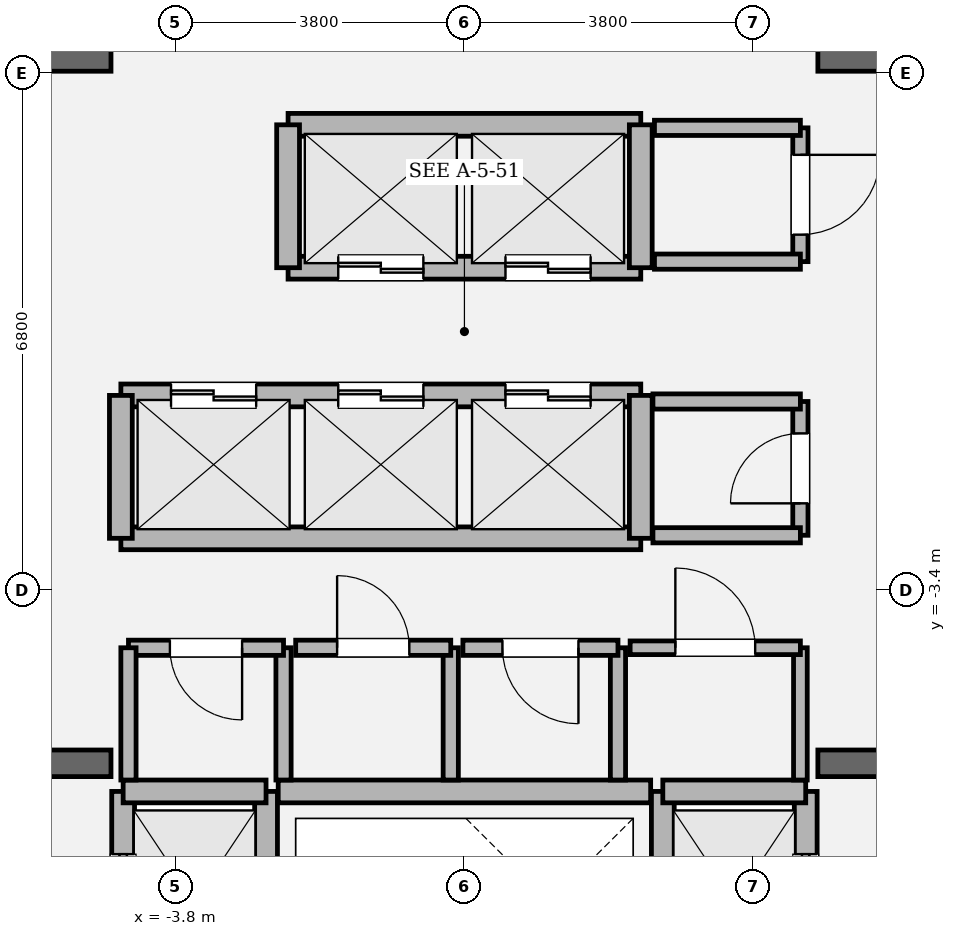
"""IFC4 building model, lengths in metres.
Left out: names, types, materials, properties, quantities, classifications, styles, units other than length and angle.
Written with IfcOpenShell. Run it as: python <this file> out.ifc"""

import sys

from ifc_helpers import new_model, si_unit, direction, frame, frame_2d, origin, place, context, subcontext, project, spatial, rectangle, extrude, element, fill, save


model = new_model("IFC4")
c1 = context("Model", 3, precision=1e-05, world=origin(), true_north=direction((0.0, 1.0)))
c2 = subcontext(c1, "Body", "Model", "MODEL_VIEW")
j1 = project(units=[si_unit("LENGTHUNIT", "METRE"), si_unit("PLANEANGLEUNIT", "RADIAN")], contexts=[c1])
p1 = place(None, origin())
s1 = spatial("IfcSite", under=j1, at=p1, CompositionType="ELEMENT")
p2 = place(p1, origin())
s2 = spatial("IfcBuilding", under=s1, at=p2, CompositionType="ELEMENT")
p3 = place(p2, frame((0.0, 0.0, 246.6)))
s3 = spatial("IfcBuildingStorey", under=s2, at=p3, CompositionType="ELEMENT", Elevation=246.6)
p4 = place(p3, frame((-9.925, -5.68, 0.0), z_axis=(0.0, 0.0, 1.0), x_axis=(1.0, 0.0, 0.0)))
e1 = element("IfcWall", 1, at=p4, inside=s3, PredefinedType="SOLIDWALL", context=c2, shape_type="SweptSolid", body=[
    extrude(rectangle(XDim=5.275, YDim=0.35, at=frame_2d((2.638, 0.0))), origin(), (0.0, 0.0, 1.0), 4.8),
])
p5 = place(p4, frame((1.385, 0.0, 0.0)))
e2 = element("IfcOpeningElement", 2, at=p5, cuts=e1, PredefinedType="OPENING", context=c2, shape_type="SweptSolid", body=[
    extrude(rectangle(XDim=1.18, YDim=2.2, at=frame_2d((0.59, 1.1))), frame((0.0, 0.185, 0.0), z_axis=(0.0, -1.0, 0.0), x_axis=(1.0, 0.0, 0.0)), (0.0, 0.0, 1.0), 0.37),
])
p6 = place(p3, frame((4.65, -5.68, 0.0), z_axis=(0.0, 0.0, 1.0), x_axis=(1.0, 0.0, 0.0)))
e3 = element("IfcWall", 3, at=p6, inside=s3, PredefinedType="SOLIDWALL", context=c2, shape_type="SweptSolid", body=[
    extrude(rectangle(XDim=5.275, YDim=0.35, at=frame_2d((2.638, 0.0))), origin(), (0.0, 0.0, 1.0), 4.8),
])
p7 = place(p6, frame((2.71, 0.0, 0.0)))
e4 = element("IfcOpeningElement", 4, at=p7, cuts=e3, PredefinedType="OPENING", context=c2, shape_type="SweptSolid", body=[
    extrude(rectangle(XDim=1.18, YDim=2.2, at=frame_2d((0.59, 1.1))), frame((0.0, 0.185, 0.0), z_axis=(0.0, -1.0, 0.0), x_axis=(1.0, 0.0, 0.0)), (0.0, 0.0, 1.0), 0.37),
])
for number, where, z_axis, x_axis in (
    (5, (-9.925, 3.6, 0.0), (0.0, 0.0, 1.0), (1.0, 0.0, 0.0)),
    (6, (4.65, 3.6, 0.0), (0.0, 0.0, 1.0), (1.0, 0.0, 0.0)),
):
    element("IfcWall", number, at=place(p3, frame(where, z_axis=z_axis, x_axis=x_axis)), inside=s3, PredefinedType="SOLIDWALL", context=c2, shape_type="SweptSolid", body=[
        extrude(rectangle(XDim=5.275, YDim=0.35, at=frame_2d((2.638, 0.0))), origin(), (0.0, 0.0, 1.0), 4.8),
    ])
p8 = place(p3, frame((-4.49, -8.82, 0.0), z_axis=(0.0, 0.0, 1.0), x_axis=(0.0, 1.0, 0.0)))
e7 = element("IfcWall", 7, at=p8, inside=s3, PredefinedType="SOLIDWALL", context=c2, shape_type="SweptSolid", body=[
    extrude(rectangle(XDim=2.77, YDim=0.3, at=frame_2d((1.385, 0.0))), origin(), (0.0, 0.0, 1.0), 4.52),
])
p9 = place(p8, frame((0.825, 0.0, 0.0)))
e8 = element("IfcOpeningElement", 8, at=p9, cuts=e7, PredefinedType="OPENING", context=c2, shape_type="SweptSolid", body=[
    extrude(rectangle(XDim=1.12, YDim=2.25, at=frame_2d((0.56, 1.125))), frame((0.0, 0.16, 0.0), z_axis=(0.0, -1.0, 0.0), x_axis=(1.0, 0.0, 0.0)), (0.0, 0.0, 1.0), 0.32),
])
p10 = place(p3, frame((-2.61, -8.82, 0.0), z_axis=(0.0, 0.0, 1.0), x_axis=(0.0, 1.0, 0.0)))
e9 = element("IfcWall", 9, at=p10, inside=s3, PredefinedType="SOLIDWALL", context=c2, shape_type="SweptSolid", body=[
    extrude(rectangle(XDim=2.77, YDim=0.3, at=frame_2d((1.385, 0.0))), origin(), (0.0, 0.0, 1.0), 4.52),
])
p11 = place(p3, frame((-4.49, -6.05, 0.0), z_axis=(0.0, 0.0, 1.0), x_axis=(1.0, 0.0, 0.0)))
e10 = element("IfcWall", 10, at=p11, inside=s3, PredefinedType="SOLIDWALL", context=c2, shape_type="SweptSolid", body=[
    extrude(rectangle(XDim=1.88, YDim=0.3, at=frame_2d((0.94, 0.0))), origin(), (0.0, 0.0, 1.0), 4.52),
])
p12 = place(p3, frame((4.49, -8.82, 0.0), z_axis=(0.0, 0.0, 1.0), x_axis=(0.0, 1.0, 0.0)))
e11 = element("IfcWall", 11, at=p12, inside=s3, PredefinedType="SOLIDWALL", context=c2, shape_type="SweptSolid", body=[
    extrude(rectangle(XDim=2.77, YDim=0.3, at=frame_2d((1.385, 0.0))), origin(), (0.0, 0.0, 1.0), 4.52),
])
p13 = place(p12, frame((0.825, 0.0, 0.0)))
e12 = element("IfcOpeningElement", 12, at=p13, cuts=e11, PredefinedType="OPENING", context=c2, shape_type="SweptSolid", body=[
    extrude(rectangle(XDim=1.12, YDim=2.25, at=frame_2d((0.56, 1.125))), frame((0.0, 0.16, 0.0), z_axis=(0.0, -1.0, 0.0), x_axis=(1.0, 0.0, 0.0)), (0.0, 0.0, 1.0), 0.32),
])
p14 = place(p3, frame((2.61, -8.82, 0.0), z_axis=(0.0, 0.0, 1.0), x_axis=(0.0, 1.0, 0.0)))
e13 = element("IfcWall", 13, at=p14, inside=s3, PredefinedType="SOLIDWALL", context=c2, shape_type="SweptSolid", body=[
    extrude(rectangle(XDim=2.77, YDim=0.3, at=frame_2d((1.385, 0.0))), origin(), (0.0, 0.0, 1.0), 4.52),
])
p15 = place(p3, frame((2.61, -6.05, 0.0), z_axis=(0.0, 0.0, 1.0), x_axis=(1.0, 0.0, 0.0)))
e14 = element("IfcWall", 14, at=p15, inside=s3, PredefinedType="SOLIDWALL", context=c2, shape_type="SweptSolid", body=[
    extrude(rectangle(XDim=1.88, YDim=0.3, at=frame_2d((0.94, 0.0))), origin(), (0.0, 0.0, 1.0), 4.52),
])
p16 = place(p3, frame((-4.52, -0.84, 0.0), z_axis=(0.0, 0.0, 1.0), x_axis=(1.0, 0.0, 0.0)))
e15 = element("IfcWall", 15, at=p16, inside=s3, PredefinedType="SOLIDWALL", context=c2, shape_type="SweptSolid", body=[
    extrude(rectangle(XDim=6.84, YDim=0.3, at=frame_2d((3.42, 0.0))), origin(), (0.0, 0.0, 1.0), 4.52),
])
p17 = place(p16, frame((0.66, 0.0, 0.0)))
e16 = element("IfcOpeningElement", 16, at=p17, cuts=e15, PredefinedType="OPENING", context=c2, shape_type="SweptSolid", body=[
    extrude(rectangle(XDim=1.12, YDim=2.25, at=frame_2d((0.56, 1.125))), frame((0.0, 0.16, 0.0), z_axis=(0.0, -1.0, 0.0), x_axis=(1.0, 0.0, 0.0)), (0.0, 0.0, 1.0), 0.32),
])
p18 = place(p16, frame((2.86, 0.0, 0.0)))
e17 = element("IfcOpeningElement", 17, at=p18, cuts=e15, PredefinedType="OPENING", context=c2, shape_type="SweptSolid", body=[
    extrude(rectangle(XDim=1.12, YDim=2.25, at=frame_2d((0.56, 1.125))), frame((0.0, 0.16, 0.0), z_axis=(0.0, -1.0, 0.0), x_axis=(1.0, 0.0, 0.0)), (0.0, 0.0, 1.0), 0.32),
])
p19 = place(p16, frame((5.06, 0.0, 0.0)))
e18 = element("IfcOpeningElement", 18, at=p19, cuts=e15, PredefinedType="OPENING", context=c2, shape_type="SweptSolid", body=[
    extrude(rectangle(XDim=1.12, YDim=2.25, at=frame_2d((0.56, 1.125))), frame((0.0, 0.16, 0.0), z_axis=(0.0, -1.0, 0.0), x_axis=(1.0, 0.0, 0.0)), (0.0, 0.0, 1.0), 0.32),
])
p20 = place(p3, frame((-4.52, -2.72, 0.0), z_axis=(0.0, 0.0, 1.0), x_axis=(1.0, 0.0, 0.0)))
e19 = element("IfcWall", 19, at=p20, inside=s3, PredefinedType="SOLIDWALL", context=c2, shape_type="SweptSolid", body=[
    extrude(rectangle(XDim=6.84, YDim=0.3, at=frame_2d((3.42, 0.0))), origin(), (0.0, 0.0, 1.0), 4.52),
])
for number, where, z_axis, x_axis in (
    (20, (-4.52, -2.72, 0.0), (0.0, 0.0, 1.0), (0.0, 1.0, 0.0)),
    (21, (2.32, -2.72, 0.0), (0.0, 0.0, 1.0), (0.0, 1.0, 0.0)),
):
    element("IfcWall", number, at=place(p3, frame(where, z_axis=z_axis, x_axis=x_axis)), inside=s3, PredefinedType="SOLIDWALL", context=c2, shape_type="SweptSolid", body=[
        extrude(rectangle(XDim=1.88, YDim=0.3, at=frame_2d((0.94, 0.0))), origin(), (0.0, 0.0, 1.0), 4.52),
    ])
p21 = place(p3, frame((-2.32, 0.84, 0.0), z_axis=(0.0, 0.0, 1.0), x_axis=(1.0, 0.0, 0.0)))
e22 = element("IfcWall", 22, at=p21, inside=s3, PredefinedType="SOLIDWALL", context=c2, shape_type="SweptSolid", body=[
    extrude(rectangle(XDim=4.64, YDim=0.3, at=frame_2d((2.32, 0.0))), origin(), (0.0, 0.0, 1.0), 4.52),
])
p22 = place(p21, frame((0.66, 0.0, 0.0)))
e23 = element("IfcOpeningElement", 23, at=p22, cuts=e22, PredefinedType="OPENING", context=c2, shape_type="SweptSolid", body=[
    extrude(rectangle(XDim=1.12, YDim=2.25, at=frame_2d((0.56, 1.125))), frame((0.0, 0.16, 0.0), z_axis=(0.0, -1.0, 0.0), x_axis=(1.0, 0.0, 0.0)), (0.0, 0.0, 1.0), 0.32),
])
p23 = place(p21, frame((2.86, 0.0, 0.0)))
e24 = element("IfcOpeningElement", 24, at=p23, cuts=e22, PredefinedType="OPENING", context=c2, shape_type="SweptSolid", body=[
    extrude(rectangle(XDim=1.12, YDim=2.25, at=frame_2d((0.56, 1.125))), frame((0.0, 0.16, 0.0), z_axis=(0.0, -1.0, 0.0), x_axis=(1.0, 0.0, 0.0)), (0.0, 0.0, 1.0), 0.32),
])
p24 = place(p3, frame((-2.32, 2.72, 0.0), z_axis=(0.0, 0.0, 1.0), x_axis=(1.0, 0.0, 0.0)))
e25 = element("IfcWall", 25, at=p24, inside=s3, PredefinedType="SOLIDWALL", context=c2, shape_type="SweptSolid", body=[
    extrude(rectangle(XDim=4.64, YDim=0.3, at=frame_2d((2.32, 0.0))), origin(), (0.0, 0.0, 1.0), 4.52),
])
for number, where, z_axis, x_axis in (
    (26, (-2.32, 0.84, 0.0), (0.0, 0.0, 1.0), (0.0, 1.0, 0.0)),
    (27, (2.32, 0.84, 0.0), (0.0, 0.0, 1.0), (0.0, 1.0, 0.0)),
):
    element("IfcWall", number, at=place(p3, frame(where, z_axis=z_axis, x_axis=x_axis)), inside=s3, PredefinedType="SOLIDWALL", context=c2, shape_type="SweptSolid", body=[
        extrude(rectangle(XDim=1.88, YDim=0.3, at=frame_2d((0.94, 0.0))), origin(), (0.0, 0.0, 1.0), 4.52),
    ])
p25 = place(p3, frame((-2.45, -6.05, 0.0), z_axis=(0.0, 0.0, 1.0), x_axis=(1.0, 0.0, 0.0)))
e28 = element("IfcWall", 28, at=p25, inside=s3, PredefinedType="SOLIDWALL", context=c2, shape_type="SweptSolid", body=[
    extrude(rectangle(XDim=4.9, YDim=0.3, at=frame_2d((2.45, 0.0))), origin(), (0.0, 0.0, 1.0), 4.52),
])
p26 = place(p3, frame((-2.38, -5.9, 0.0), z_axis=(0.0, 0.0, 1.0), x_axis=(0.0, 1.0, 0.0)))
e29 = element("IfcWall", 29, at=p26, inside=s3, PredefinedType="SOLIDWALL", context=c2, shape_type="SweptSolid", body=[
    extrude(rectangle(XDim=1.74, YDim=0.2, at=frame_2d((0.87, 0.0))), origin(), (0.0, 0.0, 1.0), 4.52),
])
p27 = place(p3, frame((-2.38, -4.16, 0.0), z_axis=(0.0, 0.0, 1.0), x_axis=(-1.0, 0.0, 0.0)))
e30 = element("IfcWall", 30, at=p27, inside=s3, PredefinedType="SOLIDWALL", context=c2, shape_type="SweptSolid", body=[
    extrude(rectangle(XDim=2.04, YDim=0.2, at=frame_2d((1.02, 0.0))), origin(), (0.0, 0.0, 1.0), 4.52),
])
p28 = place(p27, frame((0.545, 0.0, 0.0)))
e31 = element("IfcOpeningElement", 31, at=p28, cuts=e30, PredefinedType="OPENING", context=c2, shape_type="SweptSolid", body=[
    extrude(rectangle(XDim=0.95, YDim=2.15, at=frame_2d((0.475, 1.075))), frame((0.0, 0.11, 0.0), z_axis=(0.0, -1.0, 0.0), x_axis=(1.0, 0.0, 0.0)), (0.0, 0.0, 1.0), 0.22),
])
for number, where, z_axis, x_axis in (
    (32, (-4.42, -4.16, 0.0), (0.0, 0.0, 1.0), (0.0, -1.0, 0.0)),
    (33, (-0.18, -5.9, 0.0), (0.0, 0.0, 1.0), (0.0, 1.0, 0.0)),
):
    element("IfcWall", number, at=place(p3, frame(where, z_axis=z_axis, x_axis=x_axis)), inside=s3, PredefinedType="SOLIDWALL", context=c2, shape_type="SweptSolid", body=[
        extrude(rectangle(XDim=1.74, YDim=0.2, at=frame_2d((0.87, 0.0))), origin(), (0.0, 0.0, 1.0), 4.52),
    ])
p29 = place(p3, frame((-0.18, -4.16, 0.0), z_axis=(0.0, 0.0, 1.0), x_axis=(-1.0, 0.0, 0.0)))
e34 = element("IfcWall", 34, at=p29, inside=s3, PredefinedType="SOLIDWALL", context=c2, shape_type="SweptSolid", body=[
    extrude(rectangle(XDim=2.04, YDim=0.2, at=frame_2d((1.02, 0.0))), origin(), (0.0, 0.0, 1.0), 4.52),
])
p30 = place(p29, frame((0.545, 0.0, 0.0)))
e35 = element("IfcOpeningElement", 35, at=p30, cuts=e34, PredefinedType="OPENING", context=c2, shape_type="SweptSolid", body=[
    extrude(rectangle(XDim=0.95, YDim=2.15, at=frame_2d((0.475, 1.075))), frame((0.0, 0.11, 0.0), z_axis=(0.0, -1.0, 0.0), x_axis=(1.0, 0.0, 0.0)), (0.0, 0.0, 1.0), 0.22),
])
p31 = place(p3, frame((2.02, -5.9, 0.0), z_axis=(0.0, 0.0, 1.0), x_axis=(0.0, 1.0, 0.0)))
e36 = element("IfcWall", 36, at=p31, inside=s3, PredefinedType="SOLIDWALL", context=c2, shape_type="SweptSolid", body=[
    extrude(rectangle(XDim=1.74, YDim=0.2, at=frame_2d((0.87, 0.0))), origin(), (0.0, 0.0, 1.0), 4.52),
])
p32 = place(p3, frame((2.02, -4.16, 0.0), z_axis=(0.0, 0.0, 1.0), x_axis=(-1.0, 0.0, 0.0)))
e37 = element("IfcWall", 37, at=p32, inside=s3, PredefinedType="SOLIDWALL", context=c2, shape_type="SweptSolid", body=[
    extrude(rectangle(XDim=2.04, YDim=0.2, at=frame_2d((1.02, 0.0))), origin(), (0.0, 0.0, 1.0), 4.52),
])
p33 = place(p32, frame((0.52, 0.0, 0.0)))
e38 = element("IfcOpeningElement", 38, at=p33, cuts=e37, PredefinedType="OPENING", context=c2, shape_type="SweptSolid", body=[
    extrude(rectangle(XDim=1.0, YDim=2.15, at=frame_2d((0.5, 1.075))), frame((0.0, 0.11, 0.0), z_axis=(0.0, -1.0, 0.0), x_axis=(1.0, 0.0, 0.0)), (0.0, 0.0, 1.0), 0.22),
])
p34 = place(p3, frame((4.42, -5.9, 0.0), z_axis=(0.0, 0.0, 1.0), x_axis=(0.0, 1.0, 0.0)))
e39 = element("IfcWall", 39, at=p34, inside=s3, PredefinedType="PARTITIONING", context=c2, shape_type="SweptSolid", body=[
    extrude(rectangle(XDim=1.74, YDim=0.18, at=frame_2d((0.87, 0.0))), origin(), (0.0, 0.0, 1.0), 4.52),
])
p35 = place(p3, frame((4.42, -4.16, 0.0), z_axis=(0.0, 0.0, 1.0), x_axis=(-1.0, 0.0, 0.0)))
e40 = element("IfcWall", 40, at=p35, inside=s3, PredefinedType="PARTITIONING", context=c2, shape_type="SweptSolid", body=[
    extrude(rectangle(XDim=2.24, YDim=0.18, at=frame_2d((1.12, 0.0))), origin(), (0.0, 0.0, 1.0), 4.52),
])
p36 = place(p35, frame((0.595, 0.0, 0.0)))
e41 = element("IfcOpeningElement", 41, at=p36, cuts=e40, PredefinedType="OPENING", context=c2, shape_type="SweptSolid", body=[
    extrude(rectangle(XDim=1.05, YDim=2.2, at=frame_2d((0.525, 1.1))), frame((0.0, 0.1, 0.0), z_axis=(0.0, -1.0, 0.0), x_axis=(1.0, 0.0, 0.0)), (0.0, 0.0, 1.0), 0.2),
])
p37 = place(p3, frame((4.42, -2.68, 0.0), z_axis=(0.0, 0.0, 1.0), x_axis=(0.0, 1.0, 0.0)))
e42 = element("IfcWall", 42, at=p37, inside=s3, PredefinedType="SOLIDWALL", context=c2, shape_type="SweptSolid", body=[
    extrude(rectangle(XDim=1.76, YDim=0.2, at=frame_2d((0.88, 0.0))), origin(), (0.0, 0.0, 1.0), 4.52),
])
p38 = place(p37, frame((0.42, 0.0, 0.0)))
e43 = element("IfcOpeningElement", 43, at=p38, cuts=e42, PredefinedType="OPENING", context=c2, shape_type="SweptSolid", body=[
    extrude(rectangle(XDim=0.92, YDim=2.1, at=frame_2d((0.46, 1.05))), frame((0.0, 0.11, 0.0), z_axis=(0.0, -1.0, 0.0), x_axis=(1.0, 0.0, 0.0)), (0.0, 0.0, 1.0), 0.22),
])
for number, where, z_axis, x_axis in (
    (44, (4.42, -0.92, 0.0), (0.0, 0.0, 1.0), (-1.0, 0.0, 0.0)),
    (45, (2.48, -2.68, 0.0), (0.0, 0.0, 1.0), (1.0, 0.0, 0.0)),
):
    element("IfcWall", number, at=place(p3, frame(where, z_axis=z_axis, x_axis=x_axis)), inside=s3, PredefinedType="SOLIDWALL", context=c2, shape_type="SweptSolid", body=[
        extrude(rectangle(XDim=1.94, YDim=0.2, at=frame_2d((0.97, 0.0))), origin(), (0.0, 0.0, 1.0), 4.52),
    ])
p39 = place(p3, frame((4.42, 0.92, 0.0), z_axis=(0.0, 0.0, 1.0), x_axis=(0.0, 1.0, 0.0)))
e46 = element("IfcWall", 46, at=p39, inside=s3, PredefinedType="SOLIDWALL", context=c2, shape_type="SweptSolid", body=[
    extrude(rectangle(XDim=1.76, YDim=0.2, at=frame_2d((0.88, 0.0))), origin(), (0.0, 0.0, 1.0), 4.52),
])
p40 = place(p39, frame((0.355, 0.0, 0.0)))
e47 = element("IfcOpeningElement", 47, at=p40, cuts=e46, PredefinedType="OPENING", context=c2, shape_type="SweptSolid", body=[
    extrude(rectangle(XDim=1.05, YDim=2.2, at=frame_2d((0.525, 1.1))), frame((0.0, 0.11, 0.0), z_axis=(0.0, -1.0, 0.0), x_axis=(1.0, 0.0, 0.0)), (0.0, 0.0, 1.0), 0.22),
])
for number, where, z_axis, x_axis in (
    (48, (4.42, 2.68, 0.0), (0.0, 0.0, 1.0), (-1.0, 0.0, 0.0)),
    (49, (2.5, 0.92, 0.0), (0.0, 0.0, 1.0), (1.0, 0.0, 0.0)),
):
    element("IfcWall", number, at=place(p3, frame(where, z_axis=z_axis, x_axis=x_axis)), inside=s3, PredefinedType="SOLIDWALL", context=c2, shape_type="SweptSolid", body=[
        extrude(rectangle(XDim=1.92, YDim=0.2, at=frame_2d((0.96, 0.0))), origin(), (0.0, 0.0, 1.0), 4.52),
    ])
p41 = place(p9, origin())
e50 = element("IfcDoor", 50, at=p41, inside=s3, OperationType="SLIDING_TO_LEFT", PredefinedType="DOOR", context=c2, shape_type="SweptSolid", body=[
    extrude(rectangle(XDim=1.12, YDim=2.25, at=frame_2d((0.56, 1.125))), frame((0.0, 0.025, 0.0), z_axis=(0.0, -1.0, 0.0), x_axis=(1.0, 0.0, 0.0)), (0.0, 0.0, 1.0), 0.05),
])
fill(e8, e50)
p42 = place(p13, origin())
e51 = element("IfcDoor", 51, at=p42, inside=s3, OperationType="SLIDING_TO_RIGHT", PredefinedType="DOOR", context=c2, shape_type="SweptSolid", body=[
    extrude(rectangle(XDim=1.12, YDim=2.25, at=frame_2d((0.56, 1.125))), frame((0.0, 0.025, 0.0), z_axis=(0.0, -1.0, 0.0), x_axis=(1.0, 0.0, 0.0)), (0.0, 0.0, 1.0), 0.05),
])
fill(e12, e51)
p43 = place(p17, origin())
e52 = element("IfcDoor", 52, at=p43, inside=s3, OperationType="DOUBLE_DOOR_SLIDING", PredefinedType="DOOR", context=c2, shape_type="SweptSolid", body=[
    extrude(rectangle(XDim=1.12, YDim=2.25, at=frame_2d((0.56, 1.125))), frame((0.0, 0.025, 0.0), z_axis=(0.0, -1.0, 0.0), x_axis=(1.0, 0.0, 0.0)), (0.0, 0.0, 1.0), 0.05),
])
fill(e16, e52)
p44 = place(p18, origin())
e53 = element("IfcDoor", 53, at=p44, inside=s3, OperationType="DOUBLE_DOOR_SLIDING", PredefinedType="DOOR", context=c2, shape_type="SweptSolid", body=[
    extrude(rectangle(XDim=1.12, YDim=2.25, at=frame_2d((0.56, 1.125))), frame((0.0, 0.025, 0.0), z_axis=(0.0, -1.0, 0.0), x_axis=(1.0, 0.0, 0.0)), (0.0, 0.0, 1.0), 0.05),
])
fill(e17, e53)
p45 = place(p19, origin())
e54 = element("IfcDoor", 54, at=p45, inside=s3, OperationType="DOUBLE_DOOR_SLIDING", PredefinedType="DOOR", context=c2, shape_type="SweptSolid", body=[
    extrude(rectangle(XDim=1.12, YDim=2.25, at=frame_2d((0.56, 1.125))), frame((0.0, 0.025, 0.0), z_axis=(0.0, -1.0, 0.0), x_axis=(1.0, 0.0, 0.0)), (0.0, 0.0, 1.0), 0.05),
])
fill(e18, e54)
p46 = place(p22, origin())
e55 = element("IfcDoor", 55, at=p46, inside=s3, OperationType="DOUBLE_DOOR_SLIDING", PredefinedType="DOOR", context=c2, shape_type="SweptSolid", body=[
    extrude(rectangle(XDim=1.12, YDim=2.25, at=frame_2d((0.56, 1.125))), frame((0.0, 0.025, 0.0), z_axis=(0.0, -1.0, 0.0), x_axis=(1.0, 0.0, 0.0)), (0.0, 0.0, 1.0), 0.05),
])
fill(e23, e55)
p47 = place(p23, origin())
e56 = element("IfcDoor", 56, at=p47, inside=s3, OperationType="DOUBLE_DOOR_SLIDING", PredefinedType="DOOR", context=c2, shape_type="SweptSolid", body=[
    extrude(rectangle(XDim=1.12, YDim=2.25, at=frame_2d((0.56, 1.125))), frame((0.0, 0.025, 0.0), z_axis=(0.0, -1.0, 0.0), x_axis=(1.0, 0.0, 0.0)), (0.0, 0.0, 1.0), 0.05),
])
fill(e24, e56)
p48 = place(p28, origin())
e57 = element("IfcDoor", 57, at=p48, inside=s3, OperationType="SINGLE_SWING_LEFT", PredefinedType="DOOR", context=c2, shape_type="SweptSolid", body=[
    extrude(rectangle(XDim=0.95, YDim=2.15, at=frame_2d((0.475, 1.075))), frame((0.0, 0.025, 0.0), z_axis=(0.0, -1.0, 0.0), x_axis=(1.0, 0.0, 0.0)), (0.0, 0.0, 1.0), 0.05),
])
fill(e31, e57)
p49 = place(p30, origin())
e58 = element("IfcDoor", 58, at=p49, inside=s3, OperationType="SINGLE_SWING_RIGHT", PredefinedType="DOOR", context=c2, shape_type="SweptSolid", body=[
    extrude(rectangle(XDim=0.95, YDim=2.15, at=frame_2d((0.475, 1.075))), frame((0.0, 0.025, 0.0), z_axis=(0.0, -1.0, 0.0), x_axis=(1.0, 0.0, 0.0)), (0.0, 0.0, 1.0), 0.05),
])
fill(e35, e58)
p50 = place(p33, origin())
e59 = element("IfcDoor", 59, at=p50, inside=s3, OperationType="SINGLE_SWING_LEFT", PredefinedType="DOOR", context=c2, shape_type="SweptSolid", body=[
    extrude(rectangle(XDim=1.0, YDim=2.15, at=frame_2d((0.5, 1.075))), frame((0.0, 0.025, 0.0), z_axis=(0.0, -1.0, 0.0), x_axis=(1.0, 0.0, 0.0)), (0.0, 0.0, 1.0), 0.05),
])
fill(e38, e59)
p51 = place(p36, origin())
e60 = element("IfcDoor", 60, at=p51, inside=s3, OperationType="SINGLE_SWING_RIGHT", PredefinedType="DOOR", context=c2, shape_type="SweptSolid", body=[
    extrude(rectangle(XDim=1.05, YDim=2.2, at=frame_2d((0.525, 1.1))), frame((0.0, 0.025, 0.0), z_axis=(0.0, -1.0, 0.0), x_axis=(1.0, 0.0, 0.0)), (0.0, 0.0, 1.0), 0.05),
])
fill(e41, e60)
p52 = place(p38, origin())
e61 = element("IfcDoor", 61, at=p52, inside=s3, OperationType="SINGLE_SWING_LEFT", PredefinedType="DOOR", context=c2, shape_type="SweptSolid", body=[
    extrude(rectangle(XDim=0.92, YDim=2.1, at=frame_2d((0.46, 1.05))), frame((0.0, 0.025, 0.0), z_axis=(0.0, -1.0, 0.0), x_axis=(1.0, 0.0, 0.0)), (0.0, 0.0, 1.0), 0.05),
])
fill(e43, e61)
p53 = place(p40, origin())
e62 = element("IfcDoor", 62, at=p53, inside=s3, OperationType="SINGLE_SWING_RIGHT", PredefinedType="DOOR", context=c2, shape_type="SweptSolid", body=[
    extrude(rectangle(XDim=1.05, YDim=2.2, at=frame_2d((0.525, 1.1))), frame((0.0, 0.025, 0.0), z_axis=(0.0, -1.0, 0.0), x_axis=(1.0, 0.0, 0.0)), (0.0, 0.0, 1.0), 0.05),
])
fill(e47, e62)
save(model, sys.argv[1])
